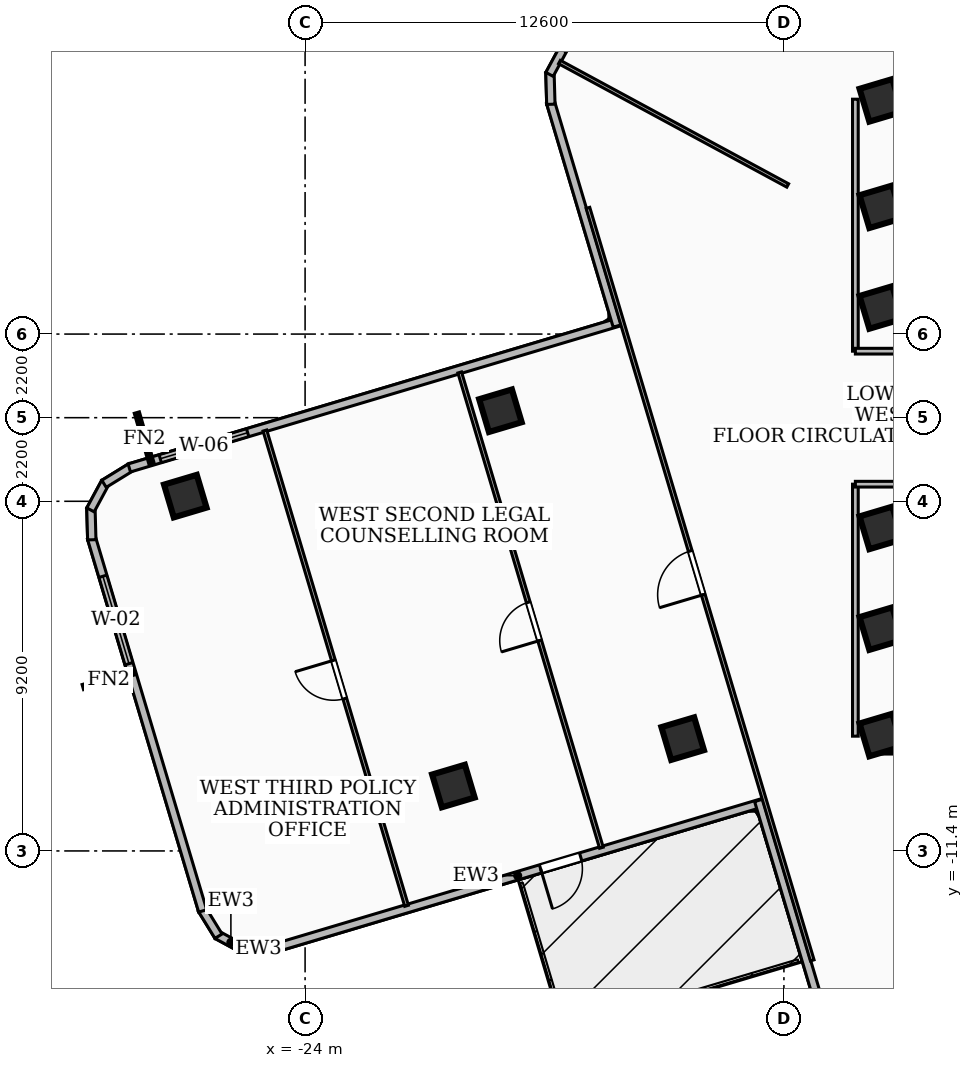
"""IFC4 building model, lengths in metres.
Left out: names, types, materials, properties, quantities, classifications, styles, units other than length and angle.
Written with IfcOpenShell. Run it as: python <this file> out.ifc"""

import sys

from ifc_helpers import new_model, si_unit, direction, frame, frame_2d, origin, origin_2d, place, context, subcontext, project, spatial, rectangle, extrude, element, fill, save


model = new_model("IFC4")
c1 = context("Model", 3, precision=1e-05, world=origin(), true_north=direction((0.0, 1.0)))
c2 = subcontext(c1, "Body", "Model", "MODEL_VIEW")
j1 = project(units=[si_unit("LENGTHUNIT", "METRE"), si_unit("PLANEANGLEUNIT", "RADIAN")], contexts=[c1])
p1 = place(None, origin())
s1 = spatial("IfcSite", under=j1, at=p1, CompositionType="ELEMENT")
p2 = place(p1, origin())
s2 = spatial("IfcBuilding", under=s1, at=p2, CompositionType="ELEMENT")
p3 = place(p2, frame((0.0, 0.0, 145.08)))
s3 = spatial("IfcBuildingStorey", under=s2, at=p3, CompositionType="ELEMENT", Elevation=145.08)
for number, where, z_axis, x_axis in (
    (1, (-8.78, 8.56, 0.0), (0.0, 0.0, 1.0), (1.0, 0.0, 0.0)),
    (2, (8.78, -8.56, 0.0), (0.0, 0.0, 1.0), (-1.0, 0.0, 0.0)),
):
    element("IfcWall", number, at=place(p3, frame(where, z_axis=z_axis, x_axis=x_axis)), inside=s3, PredefinedType="SHEAR", context=c2, shape_type="SweptSolid", body=[
        extrude(rectangle(XDim=17.56, YDim=0.5, at=frame_2d((8.78, 0.0))), origin(), (0.0, 0.0, 1.0), 3.32),
    ])
for number, where, z_axis, x_axis in (
    (3, (-8.85, -5.55, 0.0), (0.0, 0.0, 1.0), (0.958, 0.286, 0.0)),
    (4, (-8.85, -2.9, 0.0), (0.0, 0.0, 1.0), (0.958, 0.286, 0.0)),
    (5, (-8.85, 2.9, 0.0), (0.0, 0.0, 1.0), (0.958, 0.286, 0.0)),
    (6, (-8.85, 5.55, 0.0), (0.0, 0.0, 1.0), (0.958, 0.286, 0.0)),
    (7, (-8.85, 8.35, 0.0), (0.0, 0.0, 1.0), (0.958, 0.286, 0.0)),
    (8, (-8.85, -8.35, 0.0), (0.0, 0.0, 1.0), (0.958, 0.286, 0.0)),
    (9, (-18.86, 0.183, 0.0), (0.0, 0.0, 1.0), (0.958, 0.286, 0.0)),
    (10, (-14.064, -8.445, 0.0), (0.0, 0.0, 1.0), (0.958, 0.286, 0.0)),
    (11, (-27.153, -2.064, 0.0), (0.0, 0.0, 1.0), (0.958, 0.286, 0.0)),
    (12, (-20.098, -9.692, 0.0), (0.0, 0.0, 1.0), (0.958, 0.286, 0.0)),
):
    element("IfcColumn", number, at=place(p3, frame(where, z_axis=z_axis, x_axis=x_axis)), inside=s3, PredefinedType="COLUMN", context=c2, shape_type="SweptSolid", body=[
        extrude(rectangle(XDim=0.9, YDim=0.9, at=origin_2d()), origin(), (0.0, 0.0, 1.0), 3.6),
    ])
p4 = place(p3, frame((-11.957, -10.129, 0.0), z_axis=(0.0, 0.0, 1.0), x_axis=(-0.958343962332, -0.285616613419, 0.0)))
e13 = element("IfcWall", 13, at=p4, inside=s3, PredefinedType="SOLIDWALL", context=c2, shape_type="SweptSolid", body=[
    extrude(rectangle(XDim=13.458, YDim=0.22, at=frame_2d((6.729, 0.0))), origin(), (0.0, 0.0, 1.0), 3.32),
])
p5 = place(p4, frame((5.0, 0.0, 0.0)))
e14 = element("IfcOpeningElement", 14, at=p5, cuts=e13, PredefinedType="OPENING", context=c2, shape_type="SweptSolid", body=[
    extrude(rectangle(XDim=1.1, YDim=2.1, at=frame_2d((0.55, 1.05))), frame((0.0, 0.12, 0.0), z_axis=(0.0, -1.0, 0.0), x_axis=(1.0, 0.0, 0.0)), (0.0, 0.0, 1.0), 0.24),
])
p6 = place(p3, frame((-24.806, -13.965, 0.0), z_axis=(0.0, 0.0, 1.0), x_axis=(-0.999587773882, -0.028710317069, 0.0)))
e15 = element("IfcWall", 15, at=p6, inside=s3, PredefinedType="SOLIDWALL", context=c2, shape_type="SweptSolid", body=[
    extrude(rectangle(XDim=0.833, YDim=0.22, at=frame_2d((0.417, 0.0))), origin(), (0.0, 0.0, 1.0), 3.32),
])
p7 = place(p3, frame((-25.592, -14.0, 0.0), z_axis=(0.0, 0.0, 1.0), x_axis=(-0.879608832869, 0.47569769932, 0.0)))
e16 = element("IfcWall", 16, at=p7, inside=s3, PredefinedType="SOLIDWALL", context=c2, shape_type="SweptSolid", body=[
    extrude(rectangle(XDim=0.82, YDim=0.22, at=frame_2d((0.41, 0.0))), origin(), (0.0, 0.0, 1.0), 3.32),
])
p8 = place(p3, frame((-26.278, -13.643, 0.0), z_axis=(0.0, 0.0, 1.0), x_axis=(-0.524195456684, 0.851597982144, 0.0)))
e17 = element("IfcWall", 17, at=p8, inside=s3, PredefinedType="SOLIDWALL", context=c2, shape_type="SweptSolid", body=[
    extrude(rectangle(XDim=0.834, YDim=0.22, at=frame_2d((0.417, 0.0))), origin(), (0.0, 0.0, 1.0), 3.32),
])
p9 = place(p3, frame((-26.695, -12.978, 0.0), z_axis=(0.0, 0.0, 1.0), x_axis=(-0.285720239165, 0.958313072504, 0.0)))
e18 = element("IfcWall", 18, at=p9, inside=s3, PredefinedType="SOLIDWALL", context=c2, shape_type="SweptSolid", body=[
    extrude(rectangle(XDim=10.241, YDim=0.22, at=frame_2d((5.121, 0.0))), origin(), (0.0, 0.0, 1.0), 3.32),
])
p10 = place(p9, frame((6.788, 0.0, 0.85)))
e19 = element("IfcOpeningElement", 19, at=p10, cuts=e18, PredefinedType="OPENING", context=c2, shape_type="SweptSolid", body=[
    extrude(rectangle(XDim=2.4, YDim=2.1, at=frame_2d((1.2, 1.05))), frame((0.0, 0.12, 0.0), z_axis=(0.0, -1.0, 0.0), x_axis=(1.0, 0.0, 0.0)), (0.0, 0.0, 1.0), 0.24),
])
p11 = place(p3, frame((-29.613, -3.213, 0.0), z_axis=(0.0, 0.0, 1.0), x_axis=(-0.027507151941, 0.999621606705, 0.0)))
e20 = element("IfcWall", 20, at=p11, inside=s3, PredefinedType="SOLIDWALL", context=c2, shape_type="SweptSolid", body=[
    extrude(rectangle(XDim=0.834, YDim=0.22, at=frame_2d((0.417, 0.0))), origin(), (0.0, 0.0, 1.0), 3.32),
])
p12 = place(p3, frame((-29.647, -2.426, 0.0), z_axis=(0.0, 0.0, 1.0), x_axis=(0.474775054815, 0.880107179453, 0.0)))
e21 = element("IfcWall", 21, at=p12, inside=s3, PredefinedType="SOLIDWALL", context=c2, shape_type="SweptSolid", body=[
    extrude(rectangle(XDim=0.819, YDim=0.22, at=frame_2d((0.41, 0.0))), origin(), (0.0, 0.0, 1.0), 3.32),
])
p13 = place(p3, frame((-29.291, -1.74, 0.0), z_axis=(0.0, 0.0, 1.0), x_axis=(0.851597982144, 0.524195456684, 0.0)))
e22 = element("IfcWall", 22, at=p13, inside=s3, PredefinedType="SOLIDWALL", context=c2, shape_type="SweptSolid", body=[
    extrude(rectangle(XDim=0.834, YDim=0.22, at=frame_2d((0.417, 0.0))), origin(), (0.0, 0.0, 1.0), 3.32),
])
p14 = place(p3, frame((-28.626, -1.323, 0.0), z_axis=(0.0, 0.0, 1.0), x_axis=(0.958343962332, 0.285616613419, 0.0)))
e23 = element("IfcWall", 23, at=p14, inside=s3, PredefinedType="SOLIDWALL", context=c2, shape_type="SweptSolid", body=[
    extrude(rectangle(XDim=13.458, YDim=0.22, at=frame_2d((6.729, 0.0))), origin(), (0.0, 0.0, 1.0), 3.32),
])
p15 = place(p14, frame((0.85, 0.0, 0.85)))
e24 = element("IfcOpeningElement", 24, at=p15, cuts=e23, PredefinedType="OPENING", context=c2, shape_type="SweptSolid", body=[
    extrude(rectangle(XDim=2.4, YDim=1.85, at=frame_2d((1.2, 0.925))), frame((0.0, 0.12, 0.0), z_axis=(0.0, -1.0, 0.0), x_axis=(1.0, 0.0, 0.0)), (0.0, 0.0, 1.0), 0.24),
])
p16 = place(p3, frame((-15.787, 2.412, 0.0), z_axis=(0.0, 0.0, 1.0), x_axis=(-0.285712854037, 0.958315274342, 0.0)))
e25 = element("IfcWall", 25, at=p16, inside=s3, PredefinedType="SOLIDWALL", context=c2, shape_type="SweptSolid", body=[
    extrude(rectangle(XDim=6.139, YDim=0.22, at=frame_2d((3.069, 0.0))), origin(), (0.0, 0.0, 1.0), 3.32),
])
p17 = place(p3, frame((-17.533, 8.246, 0.0), z_axis=(0.0, 0.0, 1.0), x_axis=(-0.028676726094, 0.999588738122, 0.0)))
e26 = element("IfcWall", 26, at=p17, inside=s3, PredefinedType="SOLIDWALL", context=c2, shape_type="SweptSolid", body=[
    extrude(rectangle(XDim=0.834, YDim=0.22, at=frame_2d((0.417, 0.0))), origin(), (0.0, 0.0, 1.0), 3.32),
])
p18 = place(p3, frame((-17.568, 9.033, 0.0), z_axis=(0.0, 0.0, 1.0), x_axis=(0.475928115507, 0.879484183411, 0.0)))
e27 = element("IfcWall", 27, at=p18, inside=s3, PredefinedType="SOLIDWALL", context=c2, shape_type="SweptSolid", body=[
    extrude(rectangle(XDim=0.82, YDim=0.22, at=frame_2d((0.41, 0.0))), origin(), (0.0, 0.0, 1.0), 3.32),
])
p19 = place(p3, frame((-10.136, -16.546, 0.0), z_axis=(0.0, 0.0, 1.0), x_axis=(-0.285607207592, 0.958346765514, 0.0)))
e28 = element("IfcWall", 28, at=p19, inside=s3, PredefinedType="SOLIDWALL", context=c2, shape_type="SweptSolid", body=[
    extrude(rectangle(XDim=6.757, YDim=0.22, at=frame_2d((3.379, 0.0))), origin(), (0.0, 0.0, 1.0), 3.32),
])
p20 = place(p3, frame((-9.52, 1.75, 0.0), z_axis=(0.0, 0.0, 1.0), x_axis=(0.0, 1.0, 0.0)))
e29 = element("IfcWall", 29, at=p20, inside=s3, PredefinedType="PARTITIONING", context=c2, shape_type="SweptSolid", body=[
    extrude(rectangle(XDim=6.63, YDim=0.15, at=frame_2d((3.315, 0.0))), origin(), (0.0, 0.0, 1.0), 2.55),
])
p21 = place(p3, frame((-7.85, 1.75, 0.0), z_axis=(0.0, 0.0, 1.0), x_axis=(-1.0, 0.0, 0.0)))
e30 = element("IfcWall", 30, at=p21, inside=s3, PredefinedType="PARTITIONING", context=c2, shape_type="SweptSolid", body=[
    extrude(rectangle(XDim=1.67, YDim=0.15, at=frame_2d((0.835, 0.0))), origin(), (0.0, 0.0, 1.0), 2.55),
])
p22 = place(p3, frame((-9.52, -8.38, 0.0), z_axis=(0.0, 0.0, 1.0), x_axis=(0.0, 1.0, 0.0)))
e31 = element("IfcWall", 31, at=p22, inside=s3, PredefinedType="PARTITIONING", context=c2, shape_type="SweptSolid", body=[
    extrude(rectangle(XDim=6.63, YDim=0.15, at=frame_2d((3.315, 0.0))), origin(), (0.0, 0.0, 1.0), 2.55),
])
p23 = place(p3, frame((-7.85, -1.75, 0.0), z_axis=(0.0, 0.0, 1.0), x_axis=(-1.0, 0.0, 0.0)))
e32 = element("IfcWall", 32, at=p23, inside=s3, PredefinedType="PARTITIONING", context=c2, shape_type="SweptSolid", body=[
    extrude(rectangle(XDim=1.67, YDim=0.15, at=frame_2d((0.835, 0.0))), origin(), (0.0, 0.0, 1.0), 2.55),
])
p24 = place(p3, frame((-11.3, 6.11, 0.0), z_axis=(0.0, 0.0, 1.0), x_axis=(-0.879653556483, 0.475614991948, 0.0)))
e33 = element("IfcWall", 33, at=p24, inside=s3, PredefinedType="PARTITIONING", context=c2, shape_type="SweptSolid", body=[
    extrude(rectangle(XDim=6.829, YDim=0.1, at=frame_2d((3.414, 0.0))), origin(), (0.0, 0.0, 1.0), 3.32),
])
p25 = place(p3, frame((-5.612, -10.38, 0.0), z_axis=(0.0, 0.0, 1.0), x_axis=(-0.475666815962, -0.879625534073, 0.0)))
e34 = element("IfcWall", 34, at=p25, inside=s3, PredefinedType="PARTITIONING", context=c2, shape_type="SweptSolid", body=[
    extrude(rectangle(XDim=7.875, YDim=0.1, at=frame_2d((3.938, 0.0))), origin(), (0.0, 0.0, 1.0), 2.55),
])
p26 = place(p3, frame((-10.655, -14.279, 0.0), z_axis=(0.0, 0.0, 1.0), x_axis=(-0.285665949025, 0.958329257389, 0.0)))
e35 = element("IfcWall", 35, at=p26, inside=s3, PredefinedType="PARTITIONING", context=c2, shape_type="SweptSolid", body=[
    extrude(rectangle(XDim=20.66, YDim=0.1, at=frame_2d((10.33, 0.0))), origin(), (0.0, 0.0, 1.0), 2.55),
])
p27 = place(p26, frame((10.04, 0.0, 0.0)))
e36 = element("IfcOpeningElement", 36, at=p27, cuts=e35, PredefinedType="OPENING", context=c2, shape_type="SweptSolid", body=[
    extrude(rectangle(XDim=1.2, YDim=2.1, at=frame_2d((0.6, 1.05))), frame((0.0, 0.06, 0.0), z_axis=(0.0, -1.0, 0.0), x_axis=(1.0, 0.0, 0.0)), (0.0, 0.0, 1.0), 0.12),
])
p28 = place(p3, frame((-16.203, -11.316, 0.0), z_axis=(0.0, 0.0, 1.0), x_axis=(-0.285679130118, 0.958325328171, 0.0)))
e37 = element("IfcWall", 37, at=p28, inside=s3, PredefinedType="PARTITIONING", context=c2, shape_type="SweptSolid", body=[
    extrude(rectangle(XDim=13.05, YDim=0.1, at=frame_2d((6.525, 0.0))), origin(), (0.0, 0.0, 1.0), 2.55),
])
p29 = place(p28, frame((5.689, 0.0, 0.0)))
e38 = element("IfcOpeningElement", 38, at=p29, cuts=e37, PredefinedType="OPENING", context=c2, shape_type="SweptSolid", body=[
    extrude(rectangle(XDim=1.05, YDim=2.08, at=frame_2d((0.525, 1.04))), frame((0.0, 0.06, 0.0), z_axis=(0.0, -1.0, 0.0), x_axis=(1.0, 0.0, 0.0)), (0.0, 0.0, 1.0), 0.12),
])
p30 = place(p3, frame((-21.33, -12.844, 0.0), z_axis=(0.0, 0.0, 1.0), x_axis=(-0.285674008308, 0.958326854981, 0.0)))
e39 = element("IfcWall", 39, at=p30, inside=s3, PredefinedType="PARTITIONING", context=c2, shape_type="SweptSolid", body=[
    extrude(rectangle(XDim=13.05, YDim=0.1, at=frame_2d((6.525, 0.0))), origin(), (0.0, 0.0, 1.0), 2.55),
])
p31 = place(p30, frame((5.69, 0.0, 0.0)))
e40 = element("IfcOpeningElement", 40, at=p31, cuts=e39, PredefinedType="OPENING", context=c2, shape_type="SweptSolid", body=[
    extrude(rectangle(XDim=1.05, YDim=2.08, at=frame_2d((0.525, 1.04))), frame((0.0, 0.06, 0.0), z_axis=(0.0, -1.0, 0.0), x_axis=(1.0, 0.0, 0.0)), (0.0, 0.0, 1.0), 0.12),
])
p32 = place(p5, origin())
e41 = element("IfcDoor", 41, at=p32, inside=s3, OperationType="SINGLE_SWING_RIGHT", PredefinedType="DOOR", context=c2, shape_type="SweptSolid", body=[
    extrude(rectangle(XDim=1.1, YDim=2.1, at=frame_2d((0.55, 1.05))), frame((0.0, 0.025, 0.0), z_axis=(0.0, -1.0, 0.0), x_axis=(1.0, 0.0, 0.0)), (0.0, 0.0, 1.0), 0.05),
])
fill(e14, e41)
p33 = place(p10, origin())
e42 = element("IfcWindow", 42, at=p33, inside=s3, PartitioningType="SINGLE_PANEL", PredefinedType="WINDOW", context=c2, shape_type="SweptSolid", body=[
    extrude(rectangle(XDim=2.4, YDim=2.1, at=frame_2d((1.2, 1.05))), frame((0.0, 0.03, 0.0), z_axis=(0.0, -1.0, 0.0), x_axis=(1.0, 0.0, 0.0)), (0.0, 0.0, 1.0), 0.06),
])
fill(e19, e42)
p34 = place(p15, origin())
e43 = element("IfcWindow", 43, at=p34, inside=s3, PartitioningType="SINGLE_PANEL", PredefinedType="WINDOW", context=c2, shape_type="SweptSolid", body=[
    extrude(rectangle(XDim=2.4, YDim=1.85, at=frame_2d((1.2, 0.925))), frame((0.0, 0.03, 0.0), z_axis=(0.0, -1.0, 0.0), x_axis=(1.0, 0.0, 0.0)), (0.0, 0.0, 1.0), 0.06),
])
fill(e24, e43)
p35 = place(p27, origin())
e44 = element("IfcDoor", 44, at=p35, inside=s3, OperationType="SINGLE_SWING_LEFT", PredefinedType="DOOR", context=c2, shape_type="SweptSolid", body=[
    extrude(rectangle(XDim=1.2, YDim=2.1, at=frame_2d((0.6, 1.05))), frame((0.0, 0.025, 0.0), z_axis=(0.0, -1.0, 0.0), x_axis=(1.0, 0.0, 0.0)), (0.0, 0.0, 1.0), 0.05),
])
fill(e36, e44)
p36 = place(p29, origin())
e45 = element("IfcDoor", 45, at=p36, inside=s3, OperationType="SINGLE_SWING_LEFT", PredefinedType="DOOR", context=c2, shape_type="SweptSolid", body=[
    extrude(rectangle(XDim=1.05, YDim=2.08, at=frame_2d((0.525, 1.04))), frame((0.0, 0.025, 0.0), z_axis=(0.0, -1.0, 0.0), x_axis=(1.0, 0.0, 0.0)), (0.0, 0.0, 1.0), 0.05),
])
fill(e38, e45)
p37 = place(p31, origin())
e46 = element("IfcDoor", 46, at=p37, inside=s3, OperationType="SINGLE_SWING_RIGHT", PredefinedType="DOOR", context=c2, shape_type="SweptSolid", body=[
    extrude(rectangle(XDim=1.05, YDim=2.08, at=frame_2d((0.525, 1.04))), frame((0.0, 0.025, 0.0), z_axis=(0.0, -1.0, 0.0), x_axis=(1.0, 0.0, 0.0)), (0.0, 0.0, 1.0), 0.05),
])
fill(e40, e46)
save(model, sys.argv[1])
